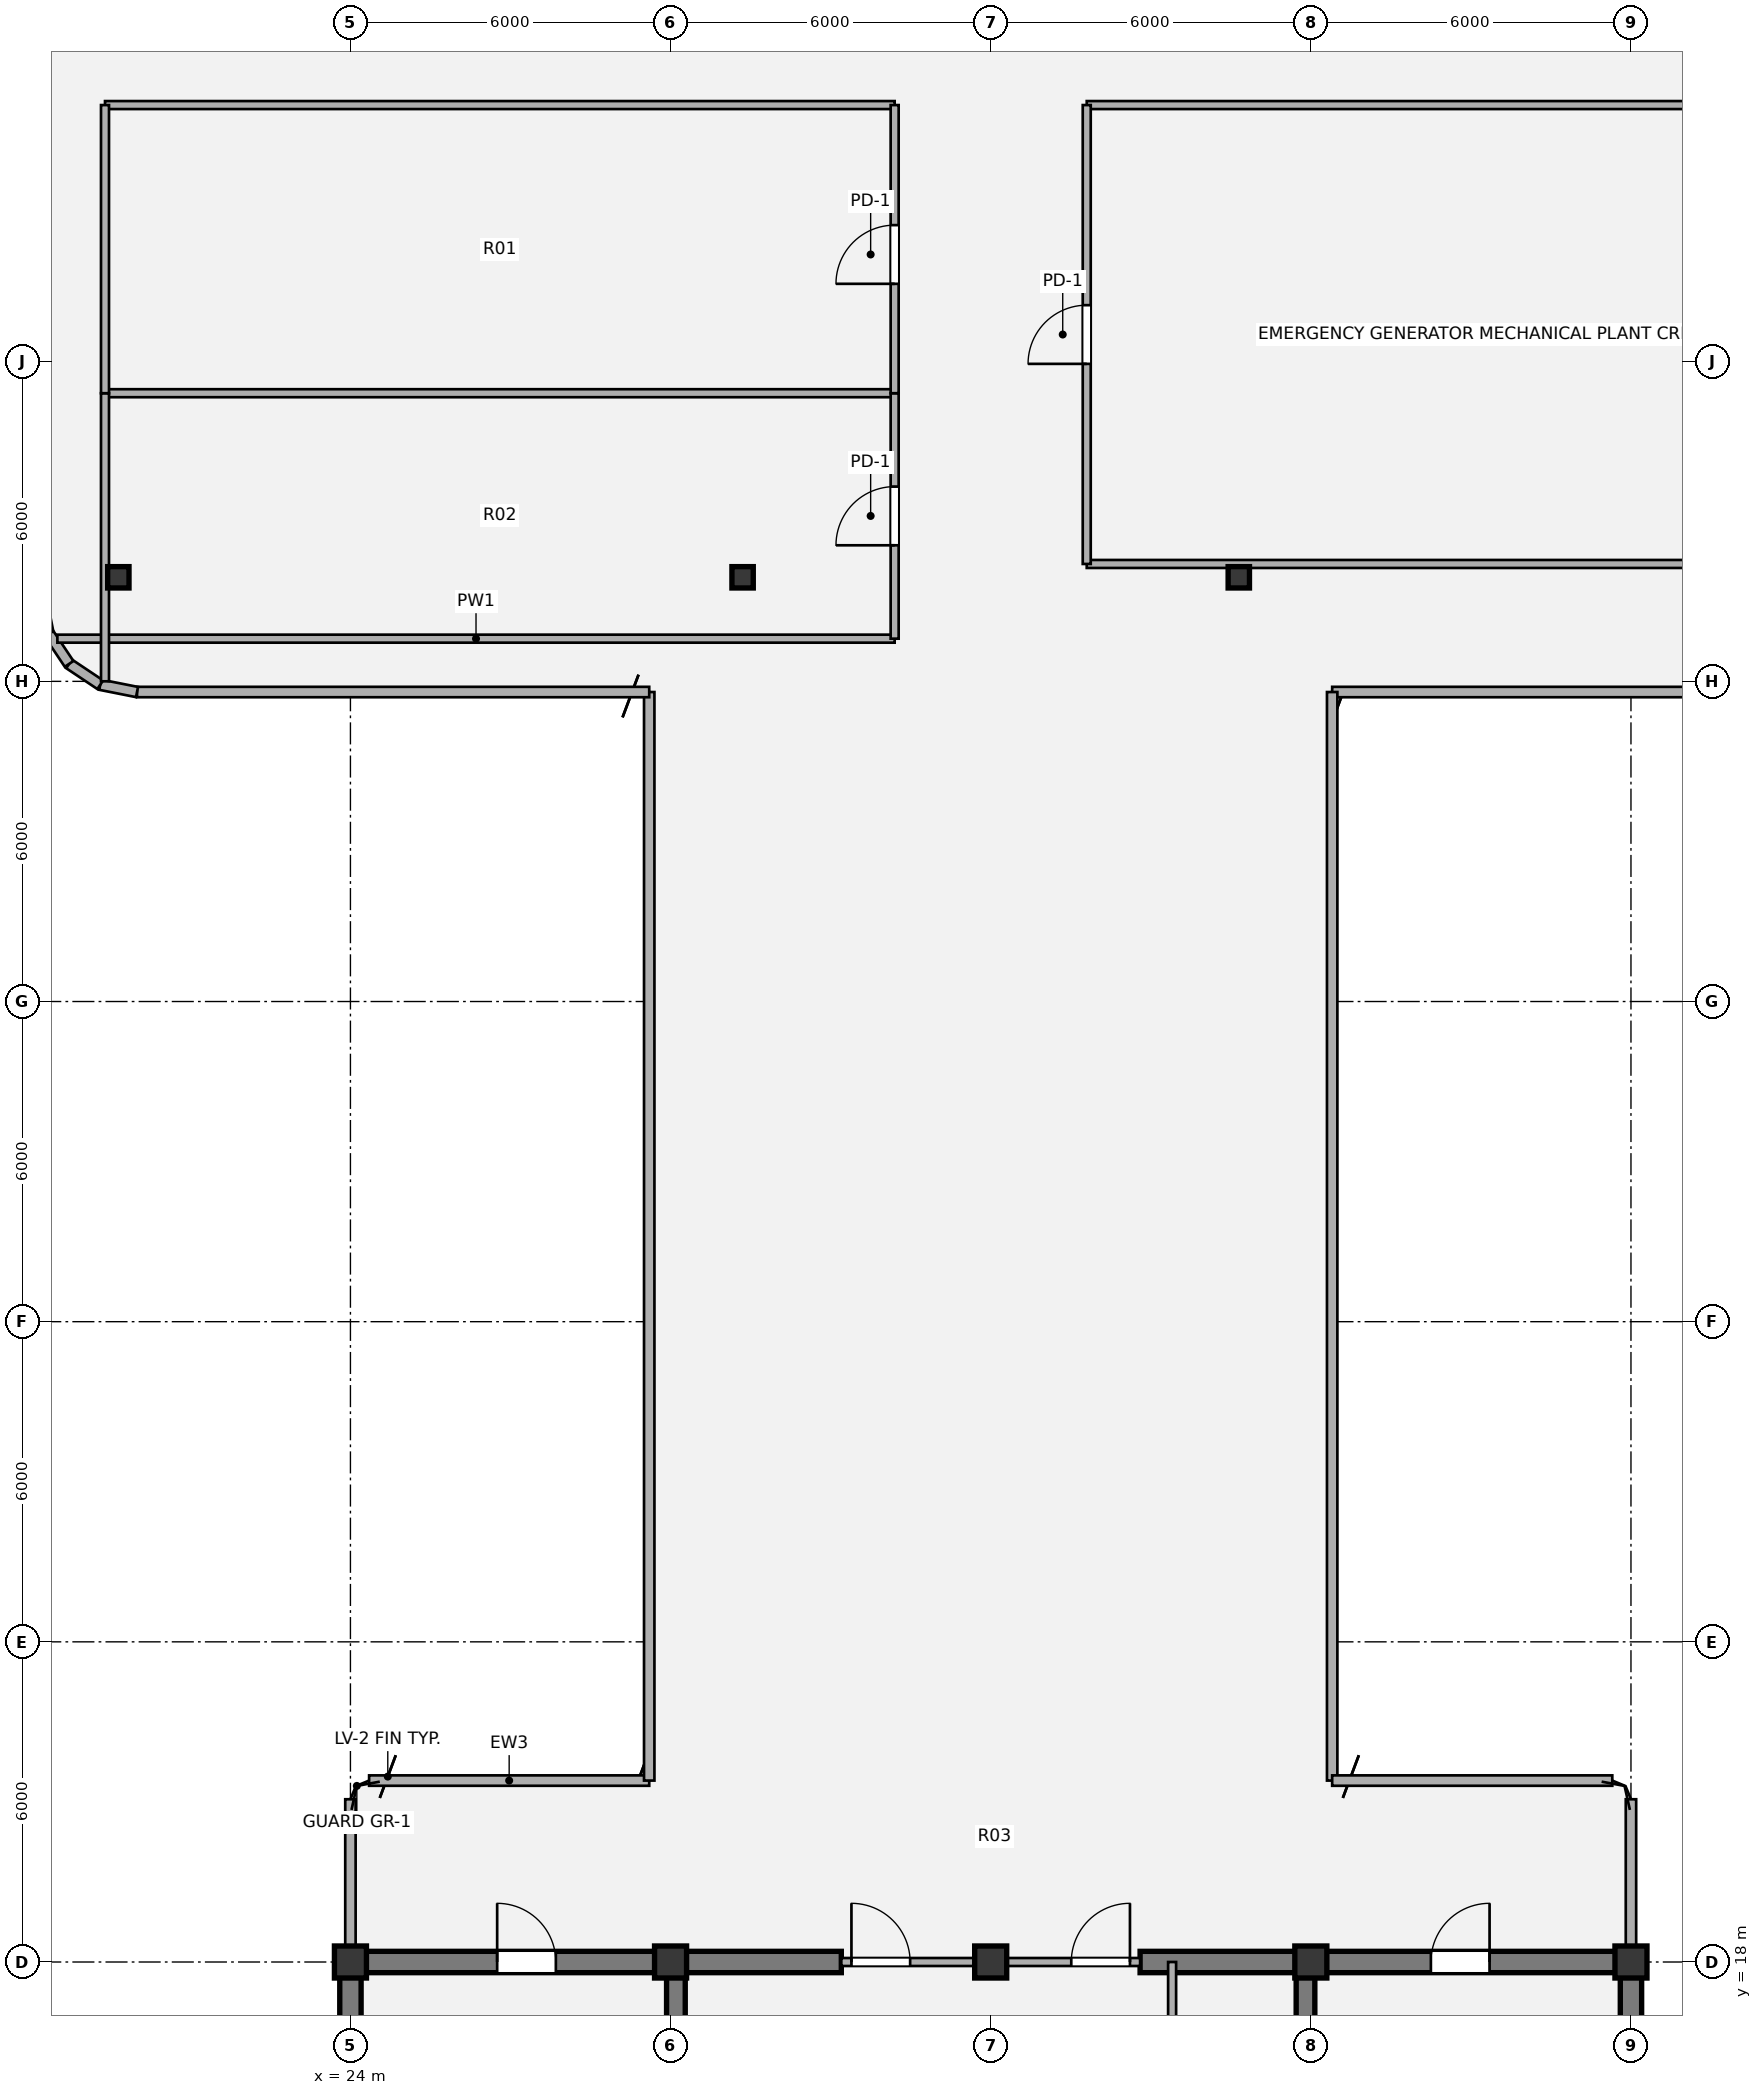
"""IFC4 building model, lengths in metres.
Left out: names, types, materials, properties, quantities, classifications, styles, units other than length and angle.
Written with IfcOpenShell. Run it as: python <this file> out.ifc"""

import sys

from ifc_helpers import new_model, si_unit, direction, frame, frame_2d, origin, origin_2d, place, context, subcontext, project, spatial, rectangle, hollow_rectangle, extrude, source, transform, mapped, element, fill, save


model = new_model("IFC4")
c1 = context("Model", 3, precision=1e-05, world=origin(), true_north=direction((0.0, 1.0)))
c2 = subcontext(c1, "Body", "Model", "MODEL_VIEW")
j1 = project(units=[si_unit("LENGTHUNIT", "METRE"), si_unit("PLANEANGLEUNIT", "RADIAN")], contexts=[c1])
p1 = place(None, origin())
s1 = spatial("IfcSite", under=j1, at=p1, CompositionType="ELEMENT")
p2 = place(p1, origin())
s2 = spatial("IfcBuilding", under=s1, at=p2, CompositionType="ELEMENT")
p3 = place(p2, frame((0.0, 0.0, 311.76)))
s3 = spatial("IfcBuildingStorey", under=s2, at=p3, CompositionType="ELEMENT", Elevation=311.76)
m1 = source(origin(), c2, "Body", "SweptSolid", [
    extrude(rectangle(XDim=0.6, YDim=0.6, at=origin_2d()), origin(), (0.0, 0.0, 1.0), 3.96),
])
for number, where, z_axis, x_axis in (
    (1, (24.0, 18.0, 0.0), (0.0, 0.0, 1.0), (1.0, 0.0, 0.0)),
    (2, (30.0, 18.0, 0.0), (0.0, 0.0, 1.0), (1.0, 0.0, 0.0)),
    (3, (36.0, 18.0, 0.0), (0.0, 0.0, 1.0), (1.0, 0.0, 0.0)),
    (4, (42.0, 18.0, 0.0), (0.0, 0.0, 1.0), (1.0, 0.0, 0.0)),
    (5, (48.0, 18.0, 0.0), (0.0, 0.0, 1.0), (1.0, 0.0, 0.0)),
):
    element("IfcColumn", number, at=place(p3, frame(where, z_axis=z_axis, x_axis=x_axis)), inside=s3, PredefinedType="COLUMN", context=c2, shape_type="MappedRepresentation", body=[
        mapped(m1, transform((0.0, 0.0, 0.0), x_axis=(1.0, 0.0, 0.0), y_axis=(0.0, 1.0, 0.0), z_axis=(0.0, 0.0, 1.0), scale=1.0)),
    ])
for number, where, z_axis, x_axis in (
    (6, (24.0, 6.0, 0.0), (0.0, 0.0, 1.0), (0.0, 1.0, 0.0)),
    (7, (48.0, 18.0, 0.0), (0.0, 0.0, 1.0), (0.0, -1.0, 0.0)),
):
    element("IfcWall", number, at=place(p3, frame(where, z_axis=z_axis, x_axis=x_axis)), inside=s3, PredefinedType="SHEAR", context=c2, shape_type="SweptSolid", body=[
        extrude(rectangle(XDim=12.0, YDim=0.4, at=frame_2d((6.0, 0.0))), origin(), (0.0, 0.0, 1.0), 3.96),
    ])
p4 = place(p3, frame((23.8, 18.0, 0.0), z_axis=(0.0, 0.0, 1.0), x_axis=(1.0, 0.0, 0.0)))
e8 = element("IfcWall", 8, at=p4, inside=s3, PredefinedType="SHEAR", context=c2, shape_type="SweptSolid", body=[
    extrude(rectangle(XDim=9.4, YDim=0.4, at=frame_2d((4.7, 0.0))), origin(), (0.0, 0.0, 1.0), 3.96),
])
p5 = place(p4, frame((2.95, 0.0, 0.0)))
e9 = element("IfcOpeningElement", 9, at=p5, cuts=e8, PredefinedType="OPENING", context=c2, shape_type="SweptSolid", body=[
    extrude(rectangle(XDim=1.1, YDim=2.1, at=origin_2d()), frame((0.55, 0.21, 1.05), z_axis=(0.0, -1.0, 0.0), x_axis=(1.0, 0.0, 0.0)), (0.0, 0.0, 1.0), 0.42),
])
p6 = place(p3, frame((38.8, 18.0, 0.0), z_axis=(0.0, 0.0, 1.0), x_axis=(1.0, 0.0, 0.0)))
e10 = element("IfcWall", 10, at=p6, inside=s3, PredefinedType="SHEAR", context=c2, shape_type="SweptSolid", body=[
    extrude(rectangle(XDim=9.4, YDim=0.4, at=frame_2d((4.7, 0.0))), origin(), (0.0, 0.0, 1.0), 3.96),
])
p7 = place(p6, frame((5.45, 0.0, 0.0)))
e11 = element("IfcOpeningElement", 11, at=p7, cuts=e10, PredefinedType="OPENING", context=c2, shape_type="SweptSolid", body=[
    extrude(rectangle(XDim=1.1, YDim=2.1, at=origin_2d()), frame((0.55, 0.21, 1.05), z_axis=(0.0, -1.0, 0.0), x_axis=(1.0, 0.0, 0.0)), (0.0, 0.0, 1.0), 0.42),
])
for number, where, z_axis, x_axis in (
    (12, (30.1, 6.0, 0.0), (0.0, 0.0, 1.0), (0.0, 1.0, 0.0)),
    (13, (41.9, 18.0, 0.0), (0.0, 0.0, 1.0), (0.0, -1.0, 0.0)),
):
    element("IfcWall", number, at=place(p3, frame(where, z_axis=z_axis, x_axis=x_axis)), inside=s3, PredefinedType="SHEAR", context=c2, shape_type="SweptSolid", body=[
        extrude(rectangle(XDim=12.0, YDim=0.35, at=frame_2d((6.0, 0.0))), origin(), (0.0, 0.0, 1.0), 3.96),
    ])
m2 = source(origin(), c2, "Body", "SweptSolid", [
    extrude(hollow_rectangle(XDim=0.4, YDim=0.4, WallThickness=0.02, OuterFilletRadius=0.04, at=origin_2d()), origin(), (0.0, 0.0, 1.0), 3.96),
])
for number, where, z_axis, x_axis in (
    (14, (19.65, 43.95, 0.0), (0.0, 0.0, 1.0), (1.0, 0.0, 0.0)),
    (15, (31.35, 43.95, 0.0), (0.0, 0.0, 1.0), (1.0, 0.0, 0.0)),
    (16, (40.65, 43.95, 0.0), (0.0, 0.0, 1.0), (1.0, 0.0, 0.0)),
):
    element("IfcColumn", number, at=place(p3, frame(where, z_axis=z_axis, x_axis=x_axis)), inside=s3, PredefinedType="COLUMN", context=c2, shape_type="MappedRepresentation", body=[
        mapped(m2, transform((0.0, 0.0, 0.0), x_axis=(1.0, 0.0, 0.0), y_axis=(0.0, 1.0, 0.0), z_axis=(0.0, 0.0, 1.0), scale=1.0)),
    ])
for number, where, z_axis, x_axis in (
    (17, (48.0, 21.05, 0.0), (0.0, 0.0, 1.0), (0.0, -1.0, 0.0)),
    (18, (24.0, 18.28, 0.0), (0.0, 0.0, 1.0), (0.0, 1.0, 0.0)),
):
    element("IfcWall", number, at=place(p3, frame(where, z_axis=z_axis, x_axis=x_axis)), inside=s3, PredefinedType="SOLIDWALL", context=c2, shape_type="SweptSolid", body=[
        extrude(rectangle(XDim=2.77, YDim=0.195, at=frame_2d((1.385, 0.0))), origin(), (0.0, 0.0, 1.0), 2.898),
    ])
p8 = place(p3, frame((24.35, 21.4, 0.0), z_axis=(0.0, 0.0, 1.0), x_axis=(1.0, 0.0, 0.0)))
e19 = element("IfcWall", 19, at=p8, inside=s3, PredefinedType="SOLIDWALL", context=c2, shape_type="SweptSolid", body=[
    extrude(rectangle(XDim=5.25, YDim=0.195, at=frame_2d((2.625, 0.0))), origin(), (0.0, 0.0, 1.0), 3.71),
])
p9 = place(p3, frame((29.6, 21.4, 0.0), z_axis=(0.0, 0.0, 1.0), x_axis=(0.0, 1.0, 0.0)))
e20 = element("IfcWall", 20, at=p9, inside=s3, PredefinedType="SOLIDWALL", context=c2, shape_type="SweptSolid", body=[
    extrude(rectangle(XDim=20.4, YDim=0.195, at=frame_2d((10.2, 0.0))), origin(), (0.0, 0.0, 1.0), 2.998),
])
p10 = place(p3, frame((29.6, 41.8, 0.0), z_axis=(0.0, 0.0, 1.0), x_axis=(-1.0, 0.0, 0.0)))
e21 = element("IfcWall", 21, at=p10, inside=s3, PredefinedType="SOLIDWALL", context=c2, shape_type="SweptSolid", body=[
    extrude(rectangle(XDim=9.6, YDim=0.195, at=frame_2d((4.8, 0.0))), origin(), (0.0, 0.0, 1.0), 3.71),
])
p11 = place(p3, frame((20.0, 41.8, 0.0), z_axis=(0.0, 0.0, 1.0), x_axis=(-0.980794046625, 0.195046246068, 0.0)))
e22 = element("IfcWall", 22, at=p11, inside=s3, PredefinedType="SOLIDWALL", context=c2, shape_type="SweptSolid", body=[
    extrude(rectangle(XDim=0.702, YDim=0.195, at=frame_2d((0.351, 0.0))), origin(), (0.0, 0.0, 1.0), 3.71),
])
for number, where, z_axis, x_axis in (
    (23, (19.311, 41.937, 0.0), (0.0, 0.0, 1.0), (-0.832, 0.556, 0.0)),
    (24, (18.727, 42.327, 0.0), (0.0, 0.0, 1.0), (-0.556, 0.831, 0.0)),
    (25, (18.337, 42.911, 0.0), (0.0, 0.0, 1.0), (-0.195, 0.981, 0.0)),
):
    element("IfcWall", number, at=place(p3, frame(where, z_axis=z_axis, x_axis=x_axis)), inside=s3, PredefinedType="SOLIDWALL", context=c2, shape_type="SweptSolid", body=[
        extrude(rectangle(XDim=0.702, YDim=0.195, at=frame_2d((0.351, 0.0))), origin(), (0.0, 0.0, 1.0), 3.71),
    ])
p12 = place(p3, frame((52.0, 41.8, 0.0), z_axis=(0.0, 0.0, 1.0), x_axis=(-1.0, 0.0, 0.0)))
e26 = element("IfcWall", 26, at=p12, inside=s3, PredefinedType="SOLIDWALL", context=c2, shape_type="SweptSolid", body=[
    extrude(rectangle(XDim=9.6, YDim=0.195, at=frame_2d((4.8, 0.0))), origin(), (0.0, 0.0, 1.0), 3.71),
])
p13 = place(p3, frame((42.4, 41.8, 0.0), z_axis=(0.0, 0.0, 1.0), x_axis=(0.0, -1.0, 0.0)))
e27 = element("IfcWall", 27, at=p13, inside=s3, PredefinedType="SOLIDWALL", context=c2, shape_type="SweptSolid", body=[
    extrude(rectangle(XDim=20.4, YDim=0.195, at=frame_2d((10.2, 0.0))), origin(), (0.0, 0.0, 1.0), 2.998),
])
p14 = place(p3, frame((42.4, 21.4, 0.0), z_axis=(0.0, 0.0, 1.0), x_axis=(1.0, 0.0, 0.0)))
e28 = element("IfcWall", 28, at=p14, inside=s3, PredefinedType="SOLIDWALL", context=c2, shape_type="SweptSolid", body=[
    extrude(rectangle(XDim=5.25, YDim=0.195, at=frame_2d((2.625, 0.0))), origin(), (0.0, 0.0, 1.0), 3.71),
])
p15 = place(p3, frame((39.4, 11.0, 0.0), z_axis=(0.0, 0.0, 1.0), x_axis=(0.0, 1.0, 0.0)))
e29 = element("IfcWall", 29, at=p15, inside=s3, PredefinedType="PARTITIONING", context=c2, shape_type="SweptSolid", body=[
    extrude(rectangle(XDim=7.0, YDim=0.15, at=frame_2d((3.5, 0.0))), origin(), (0.0, 0.0, 1.0), 3.68),
])
p16 = place(p15, frame((2.4, 0.0, 0.0)))
e30 = element("IfcOpeningElement", 30, at=p16, cuts=e29, PredefinedType="OPENING", context=c2, shape_type="SweptSolid", body=[
    extrude(rectangle(XDim=1.1, YDim=2.1, at=origin_2d()), frame((0.55, 0.085, 1.05), z_axis=(0.0, -1.0, 0.0), x_axis=(1.0, 0.0, 0.0)), (0.0, 0.0, 1.0), 0.17),
])
p17 = place(p3, frame((33.2, 18.0, 0.0), z_axis=(0.0, 0.0, 1.0), x_axis=(1.0, 0.0, 0.0)))
e31 = element("IfcWall", 31, at=p17, inside=s3, PredefinedType="PARTITIONING", context=c2, shape_type="SweptSolid", body=[
    extrude(rectangle(XDim=5.6, YDim=0.15, at=frame_2d((2.8, 0.0))), origin(), (0.0, 0.0, 1.0), 2.695),
])
p18 = place(p17, frame((0.19, 0.0, 0.0)))
e32 = element("IfcOpeningElement", 32, at=p18, cuts=e31, PredefinedType="OPENING", context=c2, shape_type="SweptSolid", body=[
    extrude(rectangle(XDim=1.1, YDim=2.1, at=origin_2d()), frame((0.55, 0.085, 1.05), z_axis=(0.0, -1.0, 0.0), x_axis=(1.0, 0.0, 0.0)), (0.0, 0.0, 1.0), 0.17),
])
p19 = place(p17, frame((4.31, 0.0, 0.0)))
e33 = element("IfcOpeningElement", 33, at=p19, cuts=e31, PredefinedType="OPENING", context=c2, shape_type="SweptSolid", body=[
    extrude(rectangle(XDim=1.1, YDim=2.1, at=origin_2d()), frame((0.55, 0.085, 1.05), z_axis=(0.0, -1.0, 0.0), x_axis=(1.0, 0.0, 0.0)), (0.0, 0.0, 1.0), 0.17),
])
p20 = place(p3, frame((18.508, 42.8, 0.0), z_axis=(0.0, 0.0, 1.0), x_axis=(1.0, 0.0, 0.0)))
e34 = element("IfcWall", 34, at=p20, inside=s3, PredefinedType="PARTITIONING", context=c2, shape_type="SweptSolid", body=[
    extrude(rectangle(XDim=15.692, YDim=0.15, at=frame_2d((7.846, 0.0))), origin(), (0.0, 0.0, 1.0), 3.68),
])
p21 = place(p3, frame((37.8, 44.2, 0.0), z_axis=(0.0, 0.0, 1.0), x_axis=(1.0, 0.0, 0.0)))
e35 = element("IfcWall", 35, at=p21, inside=s3, PredefinedType="PARTITIONING", context=c2, shape_type="SweptSolid", body=[
    extrude(rectangle(XDim=14.8, YDim=0.15, at=frame_2d((7.4, 0.0))), origin(), (0.0, 0.0, 1.0), 3.083),
])
for number, where, z_axis, x_axis in (
    (36, (19.4, 47.4, 0.0), (0.0, 0.0, 1.0), (1.0, 0.0, 0.0)),
    (37, (19.4, 52.8, 0.0), (0.0, 0.0, 1.0), (1.0, 0.0, 0.0)),
    (38, (37.8, 52.8, 0.0), (0.0, 0.0, 1.0), (1.0, 0.0, 0.0)),
):
    element("IfcWall", number, at=place(p3, frame(where, z_axis=z_axis, x_axis=x_axis)), inside=s3, PredefinedType="PARTITIONING", context=c2, shape_type="SweptSolid", body=[
        extrude(rectangle(XDim=14.8, YDim=0.15, at=frame_2d((7.4, 0.0))), origin(), (0.0, 0.0, 1.0), 3.162),
    ])
p22 = place(p3, frame((19.4, 42.001, 0.0), z_axis=(0.0, 0.0, 1.0), x_axis=(0.0, 1.0, 0.0)))
e39 = element("IfcWall", 39, at=p22, inside=s3, PredefinedType="PARTITIONING", context=c2, shape_type="SweptSolid", body=[
    extrude(rectangle(XDim=5.399, YDim=0.15, at=frame_2d((2.699, 0.0))), origin(), (0.0, 0.0, 1.0), 2.895),
])
p23 = place(p3, frame((19.4, 47.4, 0.0), z_axis=(0.0, 0.0, 1.0), x_axis=(0.0, 1.0, 0.0)))
e40 = element("IfcWall", 40, at=p23, inside=s3, PredefinedType="PARTITIONING", context=c2, shape_type="SweptSolid", body=[
    extrude(rectangle(XDim=5.4, YDim=0.15, at=frame_2d((2.7, 0.0))), origin(), (0.0, 0.0, 1.0), 2.995),
])
p24 = place(p3, frame((34.2, 42.8, 0.0), z_axis=(0.0, 0.0, 1.0), x_axis=(0.0, 1.0, 0.0)))
e41 = element("IfcWall", 41, at=p24, inside=s3, PredefinedType="PARTITIONING", context=c2, shape_type="SweptSolid", body=[
    extrude(rectangle(XDim=4.6, YDim=0.15, at=frame_2d((2.3, 0.0))), origin(), (0.0, 0.0, 1.0), 3.68),
])
p25 = place(p24, frame((1.75, 0.0, 0.0)))
e42 = element("IfcOpeningElement", 42, at=p25, cuts=e41, PredefinedType="OPENING", context=c2, shape_type="SweptSolid", body=[
    extrude(rectangle(XDim=1.1, YDim=2.1, at=origin_2d()), frame((0.55, 0.085, 1.05), z_axis=(0.0, -1.0, 0.0), x_axis=(1.0, 0.0, 0.0)), (0.0, 0.0, 1.0), 0.17),
])
p26 = place(p3, frame((34.2, 47.4, 0.0), z_axis=(0.0, 0.0, 1.0), x_axis=(0.0, 1.0, 0.0)))
e43 = element("IfcWall", 43, at=p26, inside=s3, PredefinedType="PARTITIONING", context=c2, shape_type="SweptSolid", body=[
    extrude(rectangle(XDim=5.4, YDim=0.15, at=frame_2d((2.7, 0.0))), origin(), (0.0, 0.0, 1.0), 3.68),
])
p27 = place(p26, frame((2.05, 0.0, 0.0)))
e44 = element("IfcOpeningElement", 44, at=p27, cuts=e43, PredefinedType="OPENING", context=c2, shape_type="SweptSolid", body=[
    extrude(rectangle(XDim=1.1, YDim=2.1, at=origin_2d()), frame((0.55, 0.085, 1.05), z_axis=(0.0, -1.0, 0.0), x_axis=(1.0, 0.0, 0.0)), (0.0, 0.0, 1.0), 0.17),
])
p28 = place(p3, frame((37.8, 44.2, 0.0), z_axis=(0.0, 0.0, 1.0), x_axis=(0.0, 1.0, 0.0)))
e45 = element("IfcWall", 45, at=p28, inside=s3, PredefinedType="PARTITIONING", context=c2, shape_type="SweptSolid", body=[
    extrude(rectangle(XDim=8.6, YDim=0.15, at=frame_2d((4.3, 0.0))), origin(), (0.0, 0.0, 1.0), 3.68),
])
p29 = place(p28, frame((3.75, 0.0, 0.0)))
e46 = element("IfcOpeningElement", 46, at=p29, cuts=e45, PredefinedType="OPENING", context=c2, shape_type="SweptSolid", body=[
    extrude(rectangle(XDim=1.1, YDim=2.1, at=origin_2d()), frame((0.55, 0.085, 1.05), z_axis=(0.0, -1.0, 0.0), x_axis=(1.0, 0.0, 0.0)), (0.0, 0.0, 1.0), 0.17),
])
m3 = source(origin(), c2, "Body", "SweptSolid", [
    extrude(rectangle(XDim=1.1, YDim=2.1, at=origin_2d()), frame((0.55, 0.025, 1.05), z_axis=(0.0, -1.0, 0.0), x_axis=(1.0, 0.0, 0.0)), (0.0, 0.0, 1.0), 0.05),
])
p30 = place(p18, origin())
e47 = element("IfcDoor", 47, at=p30, inside=s3, OperationType="SINGLE_SWING_LEFT", PredefinedType="DOOR", context=c2, shape_type="MappedRepresentation", body=[
    mapped(m3, transform((0.0, 0.0, 0.0), x_axis=(1.0, 0.0, 0.0), y_axis=(0.0, 1.0, 0.0), z_axis=(0.0, 0.0, 1.0), scale=1.0)),
])
fill(e32, e47)
p31 = place(p19, origin())
e48 = element("IfcDoor", 48, at=p31, inside=s3, OperationType="SINGLE_SWING_RIGHT", PredefinedType="DOOR", context=c2, shape_type="MappedRepresentation", body=[
    mapped(m3, transform((0.0, 0.0, 0.0), x_axis=(1.0, 0.0, 0.0), y_axis=(0.0, 1.0, 0.0), z_axis=(0.0, 0.0, 1.0), scale=1.0)),
])
fill(e33, e48)
p32 = place(p5, origin())
e49 = element("IfcDoor", 49, at=p32, inside=s3, OperationType="SINGLE_SWING_LEFT", PredefinedType="DOOR", context=c2, shape_type="MappedRepresentation", body=[
    mapped(m3, transform((0.0, 0.0, 0.0), x_axis=(1.0, 0.0, 0.0), y_axis=(0.0, 1.0, 0.0), z_axis=(0.0, 0.0, 1.0), scale=1.0)),
])
fill(e9, e49)
p33 = place(p7, origin())
e50 = element("IfcDoor", 50, at=p33, inside=s3, OperationType="SINGLE_SWING_RIGHT", PredefinedType="DOOR", context=c2, shape_type="MappedRepresentation", body=[
    mapped(m3, transform((0.0, 0.0, 0.0), x_axis=(1.0, 0.0, 0.0), y_axis=(0.0, 1.0, 0.0), z_axis=(0.0, 0.0, 1.0), scale=1.0)),
])
fill(e11, e50)
m4 = source(origin(), c2, "Body", "SweptSolid", [
    extrude(rectangle(XDim=1.1, YDim=2.1, at=origin_2d()), frame((0.55, 0.025, 1.05), z_axis=(0.0, -1.0, 0.0), x_axis=(1.0, 0.0, 0.0)), (0.0, 0.0, 1.0), 0.05),
])
p34 = place(p25, origin())
e51 = element("IfcDoor", 51, at=p34, inside=s3, OperationType="SINGLE_SWING_LEFT", PredefinedType="DOOR", context=c2, shape_type="MappedRepresentation", body=[
    mapped(m4, transform((0.0, 0.0, 0.0), x_axis=(1.0, 0.0, 0.0), y_axis=(0.0, 1.0, 0.0), z_axis=(0.0, 0.0, 1.0), scale=1.0)),
])
fill(e42, e51)
p35 = place(p27, origin())
e52 = element("IfcDoor", 52, at=p35, inside=s3, OperationType="SINGLE_SWING_LEFT", PredefinedType="DOOR", context=c2, shape_type="MappedRepresentation", body=[
    mapped(m4, transform((0.0, 0.0, 0.0), x_axis=(1.0, 0.0, 0.0), y_axis=(0.0, 1.0, 0.0), z_axis=(0.0, 0.0, 1.0), scale=1.0)),
])
fill(e44, e52)
p36 = place(p29, origin())
e53 = element("IfcDoor", 53, at=p36, inside=s3, OperationType="SINGLE_SWING_LEFT", PredefinedType="DOOR", context=c2, shape_type="MappedRepresentation", body=[
    mapped(m4, transform((0.0, 0.0, 0.0), x_axis=(1.0, 0.0, 0.0), y_axis=(0.0, 1.0, 0.0), z_axis=(0.0, 0.0, 1.0), scale=1.0)),
])
fill(e46, e53)
save(model, sys.argv[1])
